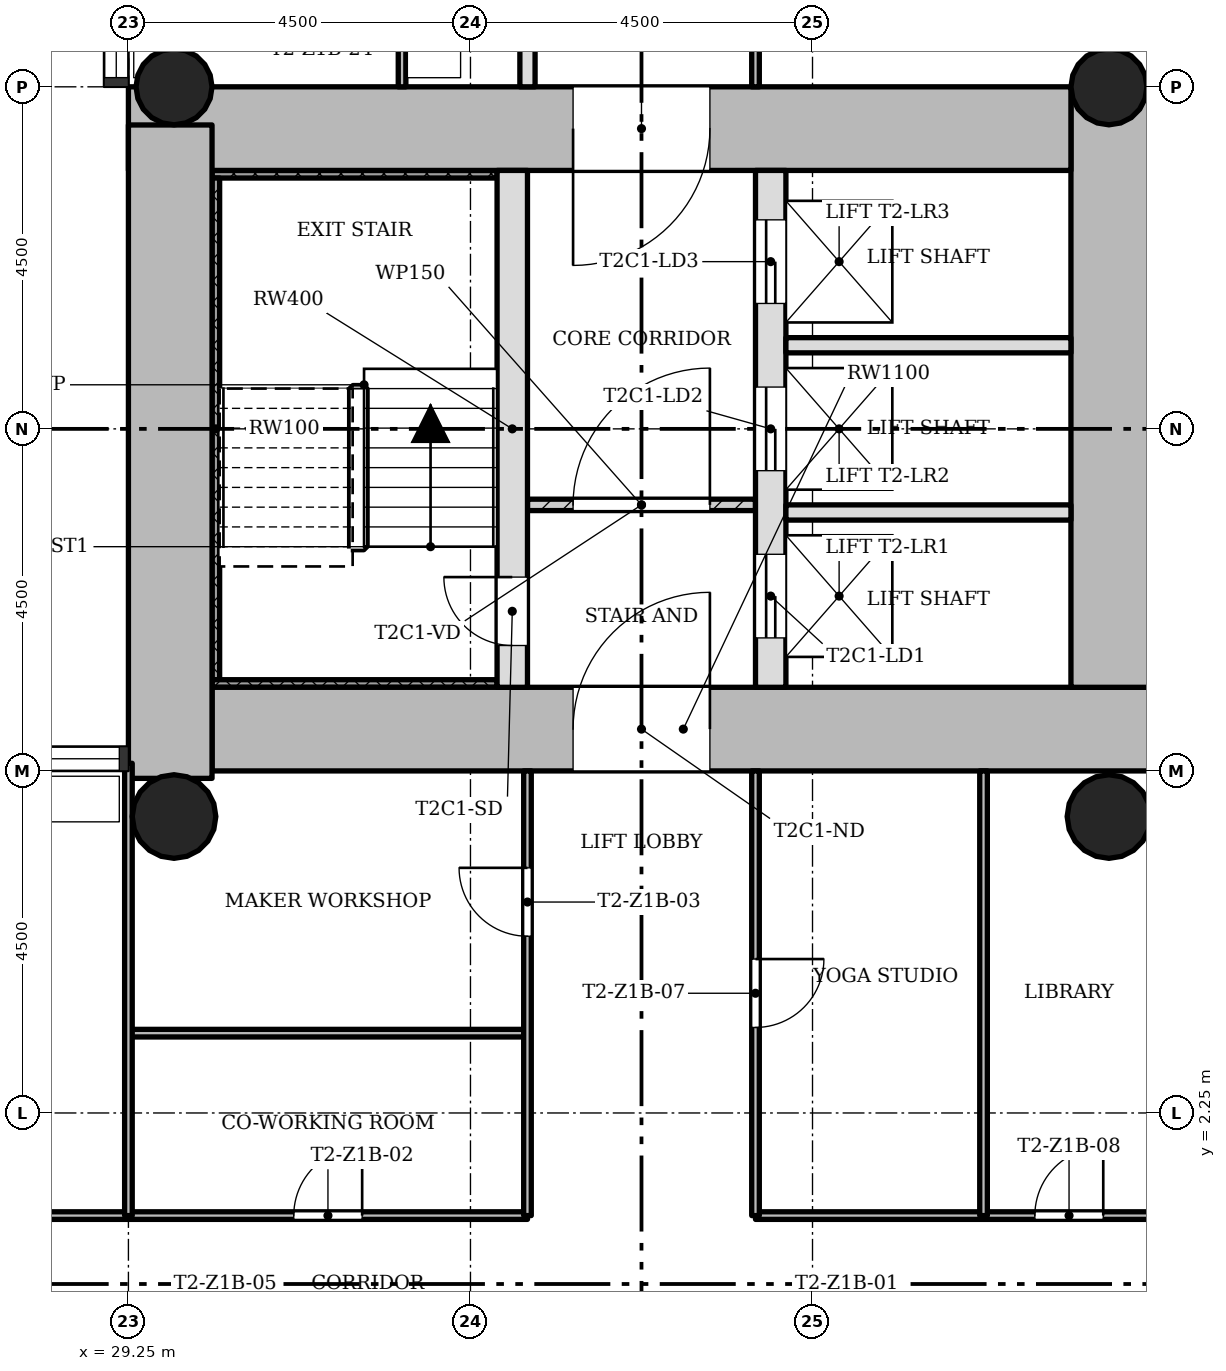
"""IFC4 building model, lengths in metres.
Left out: names, types, materials, properties, quantities, classifications, styles, units other than length and angle.
Written with IfcOpenShell. Run it as: python <this file> out.ifc"""

import sys

from ifc_helpers import new_model, si_unit, direction, frame, frame_2d, origin, origin_2d, place, context, subcontext, project, spatial, rectangle, hollow_circle, extrude, element, fill, save


model = new_model("IFC4")
c1 = context("Model", 3, precision=1e-05, world=origin(), true_north=direction((0.0, 1.0)))
c2 = subcontext(c1, "Body", "Model", "MODEL_VIEW")
j1 = project(units=[si_unit("LENGTHUNIT", "METRE"), si_unit("PLANEANGLEUNIT", "RADIAN")], contexts=[c1])
p1 = place(None, origin())
s1 = spatial("IfcSite", under=j1, at=p1, CompositionType="ELEMENT")
p2 = place(p1, origin())
s2 = spatial("IfcBuilding", under=s1, at=p2, CompositionType="ELEMENT")
p3 = place(p2, frame((0.0, 0.0, 41.5)))
s3 = spatial("IfcBuildingStorey", under=s2, at=p3, CompositionType="ELEMENT", Elevation=41.5)
p4 = place(p3, frame((30.35, 7.3, 0.0), z_axis=(0.0, 0.0, 1.0), x_axis=(1.0, 0.0, 0.0)))
e1 = element("IfcWall", 1, at=p4, inside=s3, PredefinedType="SHEAR", context=c2, shape_type="SweptSolid", body=[
    extrude(rectangle(XDim=12.4, YDim=1.1, at=frame_2d((6.2, 0.0))), origin(), (0.0, 0.0, 1.0), 3.4),
])
p5 = place(p4, frame((4.75, 0.0, 0.0)))
e2 = element("IfcOpeningElement", 2, at=p5, cuts=e1, PredefinedType="OPENING", context=c2, shape_type="SweptSolid", body=[
    extrude(rectangle(XDim=1.8, YDim=2.1, at=frame_2d((0.9, 1.05))), frame((0.0, 0.56, 0.0), z_axis=(0.0, -1.0, 0.0), x_axis=(1.0, 0.0, 0.0)), (0.0, 0.0, 1.0), 1.12),
])
p6 = place(p3, frame((42.2, 7.85, 0.0), z_axis=(0.0, 0.0, 1.0), x_axis=(0.0, 1.0, 0.0)))
e3 = element("IfcWall", 3, at=p6, inside=s3, PredefinedType="SHEAR", context=c2, shape_type="SweptSolid", body=[
    extrude(rectangle(XDim=7.9, YDim=1.1, at=frame_2d((3.95, 0.0))), origin(), (0.0, 0.0, 1.0), 3.4),
])
p7 = place(p3, frame((41.65, 15.2, 0.0), z_axis=(0.0, 0.0, 1.0), x_axis=(-1.0, 0.0, 0.0)))
e4 = element("IfcWall", 4, at=p7, inside=s3, PredefinedType="SHEAR", context=c2, shape_type="SweptSolid", body=[
    extrude(rectangle(XDim=12.4, YDim=1.1, at=frame_2d((6.2, 0.0))), origin(), (0.0, 0.0, 1.0), 3.4),
])
p8 = place(p7, frame((4.75, 0.0, 0.0)))
e5 = element("IfcOpeningElement", 5, at=p8, cuts=e4, PredefinedType="OPENING", context=c2, shape_type="SweptSolid", body=[
    extrude(rectangle(XDim=1.8, YDim=2.1, at=frame_2d((0.9, 1.05))), frame((0.0, 0.56, 0.0), z_axis=(0.0, -1.0, 0.0), x_axis=(1.0, 0.0, 0.0)), (0.0, 0.0, 1.0), 1.12),
])
p9 = place(p3, frame((29.8, 15.248, 0.0), z_axis=(0.0, 0.0, 1.0), x_axis=(0.0, -1.0, 0.0)))
e6 = element("IfcWall", 6, at=p9, inside=s3, PredefinedType="SHEAR", context=c2, shape_type="SweptSolid", body=[
    extrude(rectangle(XDim=8.596, YDim=1.1, at=frame_2d((4.298, 0.0))), origin(), (0.0, 0.0, 1.0), 3.4),
])
p10 = place(p3, frame((34.3, 7.85, 0.0), z_axis=(0.0, 0.0, 1.0), x_axis=(0.0, 1.0, 0.0)))
e7 = element("IfcWall", 7, at=p10, inside=s3, PredefinedType="SHEAR", context=c2, shape_type="SweptSolid", body=[
    extrude(rectangle(XDim=6.8, YDim=0.4, at=frame_2d((3.4, 0.0))), origin(), (0.0, 0.0, 1.0), 3.4),
])
p11 = place(p10, frame((0.55, 0.0, 0.0)))
e8 = element("IfcOpeningElement", 8, at=p11, cuts=e7, PredefinedType="OPENING", context=c2, shape_type="SweptSolid", body=[
    extrude(rectangle(XDim=0.9, YDim=2.1, at=frame_2d((0.45, 1.05))), frame((0.0, 0.21, 0.0), z_axis=(0.0, -1.0, 0.0), x_axis=(1.0, 0.0, 0.0)), (0.0, 0.0, 1.0), 0.42),
])
p12 = place(p3, frame((37.7, 7.85, 0.0), z_axis=(0.0, 0.0, 1.0), x_axis=(0.0, 1.0, 0.0)))
e9 = element("IfcWall", 9, at=p12, inside=s3, PredefinedType="SHEAR", context=c2, shape_type="SweptSolid", body=[
    extrude(rectangle(XDim=6.8, YDim=0.4, at=frame_2d((3.4, 0.0))), origin(), (0.0, 0.0, 1.0), 3.4),
])
p13 = place(p12, frame((0.65, 0.0, 0.0)))
e10 = element("IfcOpeningElement", 10, at=p13, cuts=e9, PredefinedType="OPENING", context=c2, shape_type="SweptSolid", body=[
    extrude(rectangle(XDim=1.1, YDim=2.1, at=frame_2d((0.55, 1.05))), frame((0.0, 0.21, 0.0), z_axis=(0.0, -1.0, 0.0), x_axis=(1.0, 0.0, 0.0)), (0.0, 0.0, 1.0), 0.42),
])
p14 = place(p12, frame((2.85, 0.0, 0.0)))
e11 = element("IfcOpeningElement", 11, at=p14, cuts=e9, PredefinedType="OPENING", context=c2, shape_type="SweptSolid", body=[
    extrude(rectangle(XDim=1.1, YDim=2.1, at=frame_2d((0.55, 1.05))), frame((0.0, 0.21, 0.0), z_axis=(0.0, -1.0, 0.0), x_axis=(1.0, 0.0, 0.0)), (0.0, 0.0, 1.0), 0.42),
])
p15 = place(p12, frame((5.05, 0.0, 0.0)))
e12 = element("IfcOpeningElement", 12, at=p15, cuts=e9, PredefinedType="OPENING", context=c2, shape_type="SweptSolid", body=[
    extrude(rectangle(XDim=1.1, YDim=2.1, at=frame_2d((0.55, 1.05))), frame((0.0, 0.21, 0.0), z_axis=(0.0, -1.0, 0.0), x_axis=(1.0, 0.0, 0.0)), (0.0, 0.0, 1.0), 0.42),
])
for number, where, z_axis, x_axis in (
    (13, (42.15, 15.75, 0.0), (0.0, 0.0, 1.0), (1.0, 0.0, 0.0)),
    (14, (29.85, 15.75, 0.0), (0.0, 0.0, 1.0), (1.0, 0.0, 0.0)),
):
    element("IfcColumn", number, at=place(p3, frame(where, z_axis=z_axis, x_axis=x_axis)), inside=s3, PredefinedType="COLUMN", context=c2, shape_type="SweptSolid", body=[
        extrude(hollow_circle(Radius=0.5, WallThickness=0.036, at=origin_2d()), origin(), (0.0, 0.0, 1.0), 3.4),
    ])
for number, where, z_axis, x_axis in (
    (15, (42.15, 6.15, 0.0), (0.0, 0.0, 1.0), (1.0, 0.0, 0.0)),
    (16, (29.85, 6.15, 0.0), (0.0, 0.0, 1.0), (1.0, 0.0, 0.0)),
):
    element("IfcColumn", number, at=place(p3, frame(where, z_axis=z_axis, x_axis=x_axis)), inside=s3, PredefinedType="COLUMN", context=c2, shape_type="SweptSolid", body=[
        extrude(hollow_circle(Radius=0.55, WallThickness=0.04, at=origin_2d()), origin(), (0.0, 0.0, 1.0), 3.4),
    ])
p16 = place(p3, frame((37.5, 10.25, 0.0), z_axis=(0.0, 0.0, 1.0), x_axis=(-1.0, 0.0, 0.0)))
e17 = element("IfcWall", 17, at=p16, inside=s3, PredefinedType="PARTITIONING", context=c2, shape_type="SweptSolid", body=[
    extrude(rectangle(XDim=3.0, YDim=0.15, at=frame_2d((1.5, 0.0))), origin(), (0.0, 0.0, 1.0), 3.0),
])
p17 = place(p16, frame((0.6, 0.0, 0.0)))
e18 = element("IfcOpeningElement", 18, at=p17, cuts=e17, PredefinedType="OPENING", context=c2, shape_type="SweptSolid", body=[
    extrude(rectangle(XDim=1.8, YDim=2.1, at=frame_2d((0.9, 1.05))), frame((0.0, 0.085, 0.0), z_axis=(0.0, -1.0, 0.0), x_axis=(1.0, 0.0, 0.0)), (0.0, 0.0, 1.0), 0.17),
])
for number, where, z_axis, x_axis in (
    (19, (41.65, 10.15, 0.0), (0.0, 0.0, 1.0), (-1.0, 0.0, 0.0)),
    (20, (41.65, 12.35, 0.0), (0.0, 0.0, 1.0), (-1.0, 0.0, 0.0)),
):
    element("IfcWall", number, at=place(p3, frame(where, z_axis=z_axis, x_axis=x_axis)), inside=s3, PredefinedType="SOLIDWALL", context=c2, shape_type="SweptSolid", body=[
        extrude(rectangle(XDim=3.75, YDim=0.2, at=frame_2d((1.875, 0.0))), origin(), (0.0, 0.0, 1.0), 3.0),
    ])
p18 = place(p3, frame((44.55, 0.9, 0.0), z_axis=(0.0, 0.0, 1.0), x_axis=(-1.0, 0.0, 0.0)))
e21 = element("IfcWall", 21, at=p18, inside=s3, PredefinedType="PARTITIONING", context=c2, shape_type="SweptSolid", body=[
    extrude(rectangle(XDim=7.05, YDim=0.1, at=frame_2d((3.525, 0.0))), origin(), (0.0, 0.0, 1.0), 3.0),
])
p19 = place(p18, frame((2.475, 0.0, 0.0)))
e22 = element("IfcOpeningElement", 22, at=p19, cuts=e21, PredefinedType="OPENING", context=c2, shape_type="SweptSolid", body=[
    extrude(rectangle(XDim=0.9, YDim=2.1, at=frame_2d((0.45, 1.05))), frame((0.0, 0.06, 0.0), z_axis=(0.0, -1.0, 0.0), x_axis=(1.0, 0.0, 0.0)), (0.0, 0.0, 1.0), 0.12),
])
p20 = place(p3, frame((34.5, 0.9, 0.0), z_axis=(0.0, 0.0, 1.0), x_axis=(-1.0, 0.0, 0.0)))
e23 = element("IfcWall", 23, at=p20, inside=s3, PredefinedType="PARTITIONING", context=c2, shape_type="SweptSolid", body=[
    extrude(rectangle(XDim=9.75, YDim=0.1, at=frame_2d((4.875, 0.0))), origin(), (0.0, 0.0, 1.0), 3.0),
])
p21 = place(p20, frame((2.175, 0.0, 0.0)))
e24 = element("IfcOpeningElement", 24, at=p21, cuts=e23, PredefinedType="OPENING", context=c2, shape_type="SweptSolid", body=[
    extrude(rectangle(XDim=0.9, YDim=2.1, at=frame_2d((0.45, 1.05))), frame((0.0, 0.06, 0.0), z_axis=(0.0, -1.0, 0.0), x_axis=(1.0, 0.0, 0.0)), (0.0, 0.0, 1.0), 0.12),
])
p22 = place(p20, frame((7.05, 0.0, 0.0)))
e25 = element("IfcOpeningElement", 25, at=p22, cuts=e23, PredefinedType="OPENING", context=c2, shape_type="SweptSolid", body=[
    extrude(rectangle(XDim=0.9, YDim=2.1, at=frame_2d((0.45, 1.05))), frame((0.0, 0.06, 0.0), z_axis=(0.0, -1.0, 0.0), x_axis=(1.0, 0.0, 0.0)), (0.0, 0.0, 1.0), 0.12),
])
p23 = place(p3, frame((34.5, 3.3, 0.0), z_axis=(0.0, 0.0, 1.0), x_axis=(-1.0, 0.0, 0.0)))
e26 = element("IfcWall", 26, at=p23, inside=s3, PredefinedType="PARTITIONING", context=c2, shape_type="SweptSolid", body=[
    extrude(rectangle(XDim=5.25, YDim=0.1, at=frame_2d((2.625, 0.0))), origin(), (0.0, 0.0, 1.0), 3.0),
])
p24 = place(p3, frame((40.5, 0.9, 0.0), z_axis=(0.0, 0.0, 1.0), x_axis=(0.0, 1.0, 0.0)))
e27 = element("IfcWall", 27, at=p24, inside=s3, PredefinedType="PARTITIONING", context=c2, shape_type="SweptSolid", body=[
    extrude(rectangle(XDim=5.85, YDim=0.1, at=frame_2d((2.925, 0.0))), origin(), (0.0, 0.0, 1.0), 3.0),
])
p25 = place(p3, frame((37.5, 0.9, 0.0), z_axis=(0.0, 0.0, 1.0), x_axis=(0.0, 1.0, 0.0)))
e28 = element("IfcWall", 28, at=p25, inside=s3, PredefinedType="PARTITIONING", context=c2, shape_type="SweptSolid", body=[
    extrude(rectangle(XDim=5.85, YDim=0.1, at=frame_2d((2.925, 0.0))), origin(), (0.0, 0.0, 1.0), 3.0),
])
p26 = place(p25, frame((2.475, 0.0, 0.0)))
e29 = element("IfcOpeningElement", 29, at=p26, cuts=e28, PredefinedType="OPENING", context=c2, shape_type="SweptSolid", body=[
    extrude(rectangle(XDim=0.9, YDim=2.1, at=frame_2d((0.45, 1.05))), frame((0.0, 0.06, 0.0), z_axis=(0.0, -1.0, 0.0), x_axis=(1.0, 0.0, 0.0)), (0.0, 0.0, 1.0), 0.12),
])
p27 = place(p3, frame((37.5, 15.75, 0.0), z_axis=(0.0, 0.0, 1.0), x_axis=(0.0, 1.0, 0.0)))
e30 = element("IfcWall", 30, at=p27, inside=s3, PredefinedType="PARTITIONING", context=c2, shape_type="SweptSolid", body=[
    extrude(rectangle(XDim=4.5, YDim=0.1, at=frame_2d((2.25, 0.0))), origin(), (0.0, 0.0, 1.0), 3.0),
])
p28 = place(p27, frame((1.8, 0.0, 0.0)))
e31 = element("IfcOpeningElement", 31, at=p28, cuts=e30, PredefinedType="OPENING", context=c2, shape_type="SweptSolid", body=[
    extrude(rectangle(XDim=0.9, YDim=2.1, at=frame_2d((0.45, 1.05))), frame((0.0, 0.06, 0.0), z_axis=(0.0, -1.0, 0.0), x_axis=(1.0, 0.0, 0.0)), (0.0, 0.0, 1.0), 0.12),
])
p29 = place(p3, frame((34.5, 0.9, 0.0), z_axis=(0.0, 0.0, 1.0), x_axis=(0.0, 1.0, 0.0)))
e32 = element("IfcWall", 32, at=p29, inside=s3, PredefinedType="PARTITIONING", context=c2, shape_type="SweptSolid", body=[
    extrude(rectangle(XDim=5.85, YDim=0.1, at=frame_2d((2.925, 0.0))), origin(), (0.0, 0.0, 1.0), 3.0),
])
p30 = place(p29, frame((3.675, 0.0, 0.0)))
e33 = element("IfcOpeningElement", 33, at=p30, cuts=e32, PredefinedType="OPENING", context=c2, shape_type="SweptSolid", body=[
    extrude(rectangle(XDim=0.9, YDim=2.1, at=frame_2d((0.45, 1.05))), frame((0.0, 0.06, 0.0), z_axis=(0.0, -1.0, 0.0), x_axis=(1.0, 0.0, 0.0)), (0.0, 0.0, 1.0), 0.12),
])
p31 = place(p3, frame((34.5, 15.75, 0.0), z_axis=(0.0, 0.0, 1.0), x_axis=(0.0, 1.0, 0.0)))
e34 = element("IfcWall", 34, at=p31, inside=s3, PredefinedType="SOLIDWALL", context=c2, shape_type="SweptSolid", body=[
    extrude(rectangle(XDim=4.5, YDim=0.2, at=frame_2d((2.25, 0.0))), origin(), (0.0, 0.0, 1.0), 3.0),
])
p32 = place(p31, frame((3.0, 0.0, 0.0)))
e35 = element("IfcOpeningElement", 35, at=p32, cuts=e34, PredefinedType="OPENING", context=c2, shape_type="SweptSolid", body=[
    extrude(rectangle(XDim=0.9, YDim=2.1, at=frame_2d((0.45, 1.05))), frame((0.0, 0.11, 0.0), z_axis=(0.0, -1.0, 0.0), x_axis=(1.0, 0.0, 0.0)), (0.0, 0.0, 1.0), 0.22),
])
p33 = place(p3, frame((32.85, 15.75, 0.0), z_axis=(0.0, 0.0, 1.0), x_axis=(0.0, 1.0, 0.0)))
e36 = element("IfcWall", 36, at=p33, inside=s3, PredefinedType="PARTITIONING", context=c2, shape_type="SweptSolid", body=[
    extrude(rectangle(XDim=4.5, YDim=0.1, at=frame_2d((2.25, 0.0))), origin(), (0.0, 0.0, 1.0), 3.0),
])
p34 = place(p33, frame((3.0, 0.0, 0.0)))
e37 = element("IfcOpeningElement", 37, at=p34, cuts=e36, PredefinedType="OPENING", context=c2, shape_type="SweptSolid", body=[
    extrude(rectangle(XDim=0.9, YDim=2.1, at=frame_2d((0.45, 1.05))), frame((0.0, 0.06, 0.0), z_axis=(0.0, -1.0, 0.0), x_axis=(1.0, 0.0, 0.0)), (0.0, 0.0, 1.0), 0.12),
])
p35 = place(p3, frame((29.25, 0.9, 0.0), z_axis=(0.0, 0.0, 1.0), x_axis=(0.0, 1.0, 0.0)))
e38 = element("IfcWall", 38, at=p35, inside=s3, PredefinedType="PARTITIONING", context=c2, shape_type="SweptSolid", body=[
    extrude(rectangle(XDim=5.95, YDim=0.1, at=frame_2d((2.975, 0.0))), origin(), (0.0, 0.0, 1.0), 3.0),
])
p36 = place(p3, frame((34.1, 14.6, 0.0), z_axis=(0.0, 0.0, 1.0), x_axis=(-1.0, 0.0, 0.0)))
e39 = element("IfcWall", 39, at=p36, inside=s3, PredefinedType="SHEAR", context=c2, shape_type="SweptSolid", body=[
    extrude(rectangle(XDim=3.75, YDim=0.1, at=frame_2d((1.875, 0.0))), origin(), (0.0, 0.0, 1.0), 3.4),
])
p37 = place(p3, frame((30.4, 7.95, 0.0), z_axis=(0.0, 0.0, 1.0), x_axis=(0.0, 1.0, 0.0)))
e40 = element("IfcWall", 40, at=p37, inside=s3, PredefinedType="SHEAR", context=c2, shape_type="SweptSolid", body=[
    extrude(rectangle(XDim=6.6, YDim=0.1, at=frame_2d((3.3, 0.0))), origin(), (0.0, 0.0, 1.0), 3.4),
])
p38 = place(p3, frame((34.1, 7.9, 0.0), z_axis=(0.0, 0.0, 1.0), x_axis=(-1.0, 0.0, 0.0)))
e41 = element("IfcWall", 41, at=p38, inside=s3, PredefinedType="SHEAR", context=c2, shape_type="SweptSolid", body=[
    extrude(rectangle(XDim=3.75, YDim=0.1, at=frame_2d((1.875, 0.0))), origin(), (0.0, 0.0, 1.0), 3.4),
])
p39 = place(p17, origin())
e42 = element("IfcDoor", 42, at=p39, inside=s3, OperationType="SINGLE_SWING_LEFT", PredefinedType="DOOR", context=c2, shape_type="SweptSolid", body=[
    extrude(rectangle(XDim=1.8, YDim=2.1, at=frame_2d((0.9, 1.05))), frame((0.0, 0.025, 0.0), z_axis=(0.0, -1.0, 0.0), x_axis=(1.0, 0.0, 0.0)), (0.0, 0.0, 1.0), 0.05),
])
fill(e18, e42)
p40 = place(p21, origin())
e43 = element("IfcDoor", 43, at=p40, inside=s3, OperationType="SINGLE_SWING_LEFT", PredefinedType="DOOR", context=c2, shape_type="SweptSolid", body=[
    extrude(rectangle(XDim=0.9, YDim=2.1, at=frame_2d((0.45, 1.05))), frame((0.0, 0.025, 0.0), z_axis=(0.0, -1.0, 0.0), x_axis=(1.0, 0.0, 0.0)), (0.0, 0.0, 1.0), 0.05),
])
fill(e24, e43)
p41 = place(p30, origin())
e44 = element("IfcDoor", 44, at=p41, inside=s3, OperationType="SINGLE_SWING_LEFT", PredefinedType="DOOR", context=c2, shape_type="SweptSolid", body=[
    extrude(rectangle(XDim=0.9, YDim=2.1, at=frame_2d((0.45, 1.05))), frame((0.0, 0.025, 0.0), z_axis=(0.0, -1.0, 0.0), x_axis=(1.0, 0.0, 0.0)), (0.0, 0.0, 1.0), 0.05),
])
fill(e33, e44)
p42 = place(p26, origin())
e45 = element("IfcDoor", 45, at=p42, inside=s3, OperationType="SINGLE_SWING_RIGHT", PredefinedType="DOOR", context=c2, shape_type="SweptSolid", body=[
    extrude(rectangle(XDim=0.9, YDim=2.1, at=frame_2d((0.45, 1.05))), frame((0.0, 0.025, 0.0), z_axis=(0.0, -1.0, 0.0), x_axis=(1.0, 0.0, 0.0)), (0.0, 0.0, 1.0), 0.05),
])
fill(e29, e45)
p43 = place(p19, origin())
e46 = element("IfcDoor", 46, at=p43, inside=s3, OperationType="SINGLE_SWING_LEFT", PredefinedType="DOOR", context=c2, shape_type="SweptSolid", body=[
    extrude(rectangle(XDim=0.9, YDim=2.1, at=frame_2d((0.45, 1.05))), frame((0.0, 0.025, 0.0), z_axis=(0.0, -1.0, 0.0), x_axis=(1.0, 0.0, 0.0)), (0.0, 0.0, 1.0), 0.05),
])
fill(e22, e46)
p44 = place(p11, origin())
e47 = element("IfcDoor", 47, at=p44, inside=s3, OperationType="SINGLE_SWING_LEFT", PredefinedType="DOOR", context=c2, shape_type="SweptSolid", body=[
    extrude(rectangle(XDim=0.9, YDim=2.1, at=frame_2d((0.45, 1.05))), frame((0.0, 0.025, 0.0), z_axis=(0.0, -1.0, 0.0), x_axis=(1.0, 0.0, 0.0)), (0.0, 0.0, 1.0), 0.05),
])
fill(e8, e47)
p45 = place(p13, origin())
e48 = element("IfcDoor", 48, at=p45, inside=s3, OperationType="SLIDING_TO_LEFT", PredefinedType="DOOR", context=c2, shape_type="SweptSolid", body=[
    extrude(rectangle(XDim=1.1, YDim=2.1, at=frame_2d((0.55, 1.05))), frame((0.0, 0.025, 0.0), z_axis=(0.0, -1.0, 0.0), x_axis=(1.0, 0.0, 0.0)), (0.0, 0.0, 1.0), 0.05),
])
fill(e10, e48)
p46 = place(p14, origin())
e49 = element("IfcDoor", 49, at=p46, inside=s3, OperationType="SLIDING_TO_LEFT", PredefinedType="DOOR", context=c2, shape_type="SweptSolid", body=[
    extrude(rectangle(XDim=1.1, YDim=2.1, at=frame_2d((0.55, 1.05))), frame((0.0, 0.025, 0.0), z_axis=(0.0, -1.0, 0.0), x_axis=(1.0, 0.0, 0.0)), (0.0, 0.0, 1.0), 0.05),
])
fill(e11, e49)
p47 = place(p15, origin())
e50 = element("IfcDoor", 50, at=p47, inside=s3, OperationType="SLIDING_TO_LEFT", PredefinedType="DOOR", context=c2, shape_type="SweptSolid", body=[
    extrude(rectangle(XDim=1.1, YDim=2.1, at=frame_2d((0.55, 1.05))), frame((0.0, 0.025, 0.0), z_axis=(0.0, -1.0, 0.0), x_axis=(1.0, 0.0, 0.0)), (0.0, 0.0, 1.0), 0.05),
])
fill(e12, e50)
p48 = place(p5, origin())
e51 = element("IfcDoor", 51, at=p48, inside=s3, OperationType="SINGLE_SWING_LEFT", PredefinedType="DOOR", context=c2, shape_type="SweptSolid", body=[
    extrude(rectangle(XDim=1.8, YDim=2.1, at=frame_2d((0.9, 1.05))), frame((0.0, 0.025, 0.0), z_axis=(0.0, -1.0, 0.0), x_axis=(1.0, 0.0, 0.0)), (0.0, 0.0, 1.0), 0.05),
])
fill(e2, e51)
p49 = place(p8, origin())
e52 = element("IfcDoor", 52, at=p49, inside=s3, OperationType="SINGLE_SWING_LEFT", PredefinedType="DOOR", context=c2, shape_type="SweptSolid", body=[
    extrude(rectangle(XDim=1.8, YDim=2.1, at=frame_2d((0.9, 1.05))), frame((0.0, 0.025, 0.0), z_axis=(0.0, -1.0, 0.0), x_axis=(1.0, 0.0, 0.0)), (0.0, 0.0, 1.0), 0.05),
])
fill(e5, e52)
save(model, sys.argv[1])
